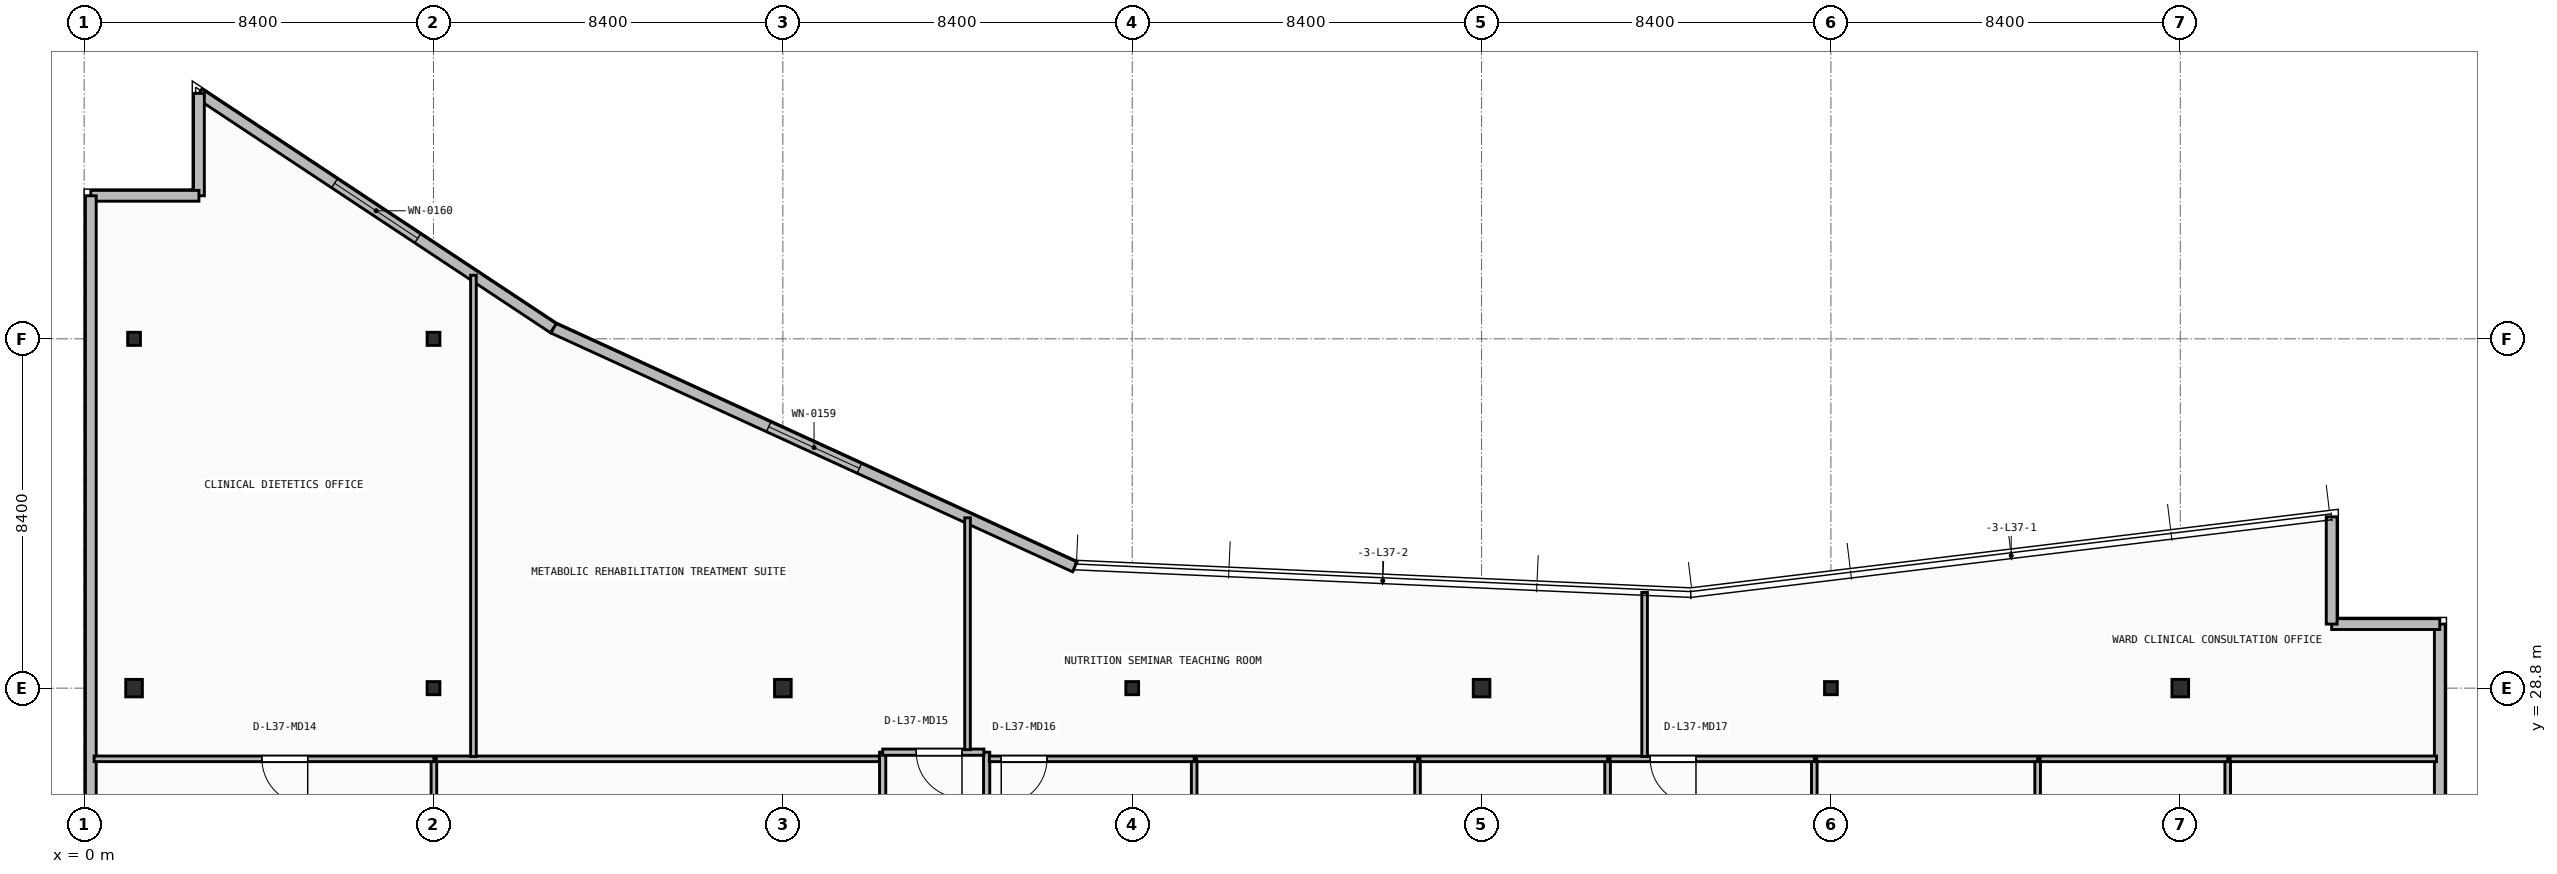
"""IFC4 building model, lengths in metres.
Left out: names, types, materials, properties, quantities, classifications, styles, units other than length and angle.
Written with IfcOpenShell. Run it as: python <this file> out.ifc"""

import sys

from ifc_helpers import new_model, si_unit, direction, frame, frame_2d, origin, origin_2d, place, context, subcontext, project, spatial, rectangle, i_section, extrude, element, fill, save


model = new_model("IFC4")
c1 = context("Model", 3, precision=1e-05, world=origin(), true_north=direction((0.0, 1.0)))
c2 = subcontext(c1, "Body", "Model", "MODEL_VIEW")
j1 = project(units=[si_unit("LENGTHUNIT", "METRE"), si_unit("PLANEANGLEUNIT", "RADIAN")], contexts=[c1])
p1 = place(None, origin())
s1 = spatial("IfcSite", under=j1, at=p1, CompositionType="ELEMENT")
p2 = place(p1, origin())
s2 = spatial("IfcBuilding", under=s1, at=p2, CompositionType="ELEMENT")
p3 = place(p2, frame((0.0, 0.0, 150.75)))
s3 = spatial("IfcBuildingStorey", under=s2, at=p3, CompositionType="ELEMENT", Elevation=150.75)
p4 = place(p3, frame((1.2, 28.8, 0.0), z_axis=(0.0, 0.0, 1.0), x_axis=(1.0, 0.0, 0.0)))
e1 = element("IfcColumn", 1, at=p4, inside=s3, PredefinedType="COLUMN", context=c2, shape_type="SweptSolid", body=[
    extrude(i_section(OverallWidth=0.4, OverallDepth=0.42, WebThickness=0.025, FlangeThickness=0.04, at=origin_2d()), origin(), (0.0, 0.0, 1.0), 3.95),
])
p5 = place(p3, frame((8.4, 28.8, 0.0), z_axis=(0.0, 0.0, 1.0), x_axis=(1.0, 0.0, 0.0)))
e2 = element("IfcColumn", 2, at=p5, inside=s3, PredefinedType="COLUMN", context=c2, shape_type="SweptSolid", body=[
    extrude(i_section(OverallWidth=0.307, OverallDepth=0.315, WebThickness=0.012, FlangeThickness=0.019, FilletRadius=0.017, at=origin_2d()), origin(), (0.0, 0.0, 1.0), 3.95),
])
p6 = place(p3, frame((16.8, 28.8, 0.0), z_axis=(0.0, 0.0, 1.0), x_axis=(1.0, 0.0, 0.0)))
e3 = element("IfcColumn", 3, at=p6, inside=s3, PredefinedType="COLUMN", context=c2, shape_type="SweptSolid", body=[
    extrude(i_section(OverallWidth=0.4, OverallDepth=0.42, WebThickness=0.025, FlangeThickness=0.04, at=origin_2d()), origin(), (0.0, 0.0, 1.0), 3.95),
])
p7 = place(p3, frame((25.2, 28.8, 0.0), z_axis=(0.0, 0.0, 1.0), x_axis=(1.0, 0.0, 0.0)))
e4 = element("IfcColumn", 4, at=p7, inside=s3, PredefinedType="COLUMN", context=c2, shape_type="SweptSolid", body=[
    extrude(i_section(OverallWidth=0.307, OverallDepth=0.315, WebThickness=0.012, FlangeThickness=0.019, FilletRadius=0.017, at=origin_2d()), origin(), (0.0, 0.0, 1.0), 3.95),
])
p8 = place(p3, frame((33.6, 28.8, 0.0), z_axis=(0.0, 0.0, 1.0), x_axis=(1.0, 0.0, 0.0)))
e5 = element("IfcColumn", 5, at=p8, inside=s3, PredefinedType="COLUMN", context=c2, shape_type="SweptSolid", body=[
    extrude(i_section(OverallWidth=0.4, OverallDepth=0.42, WebThickness=0.025, FlangeThickness=0.04, at=origin_2d()), origin(), (0.0, 0.0, 1.0), 3.95),
])
p9 = place(p3, frame((42.0, 28.8, 0.0), z_axis=(0.0, 0.0, 1.0), x_axis=(1.0, 0.0, 0.0)))
e6 = element("IfcColumn", 6, at=p9, inside=s3, PredefinedType="COLUMN", context=c2, shape_type="SweptSolid", body=[
    extrude(i_section(OverallWidth=0.307, OverallDepth=0.315, WebThickness=0.012, FlangeThickness=0.019, FilletRadius=0.017, at=origin_2d()), origin(), (0.0, 0.0, 1.0), 3.95),
])
p10 = place(p3, frame((50.4, 28.8, 0.0), z_axis=(0.0, 0.0, 1.0), x_axis=(1.0, 0.0, 0.0)))
e7 = element("IfcColumn", 7, at=p10, inside=s3, PredefinedType="COLUMN", context=c2, shape_type="SweptSolid", body=[
    extrude(i_section(OverallWidth=0.4, OverallDepth=0.42, WebThickness=0.025, FlangeThickness=0.04, at=origin_2d()), origin(), (0.0, 0.0, 1.0), 3.95),
])
for number, where, z_axis, x_axis in (
    (8, (1.2, 37.2, 0.0), (0.0, 0.0, 1.0), (1.0, 0.0, 0.0)),
    (9, (8.4, 37.2, 0.0), (0.0, 0.0, 1.0), (1.0, 0.0, 0.0)),
):
    element("IfcColumn", number, at=place(p3, frame(where, z_axis=z_axis, x_axis=x_axis)), inside=s3, PredefinedType="COLUMN", context=c2, shape_type="SweptSolid", body=[
        extrude(i_section(OverallWidth=0.307, OverallDepth=0.315, WebThickness=0.012, FlangeThickness=0.019, FilletRadius=0.017, at=origin_2d()), origin(), (0.0, 0.0, 1.0), 3.95),
    ])
p11 = place(p3, frame((56.64, 6.86, 0.0), z_axis=(0.0, 0.0, 1.0), x_axis=(0.0, 1.0, 0.0)))
e10 = element("IfcWall", 10, at=p11, inside=s3, PredefinedType="STANDARD", context=c2, shape_type="SweptSolid", body=[
    extrude(rectangle(XDim=23.48, YDim=0.26, at=frame_2d((11.74, 0.0))), origin(), (0.0, 0.0, 1.0), 3.71),
])
p12 = place(p11, frame((9.24, 0.0, 0.0)))
e11 = element("IfcOpeningElement", 11, at=p12, cuts=e10, PredefinedType="OPENING", context=c2, shape_type="SweptSolid", body=[
    extrude(rectangle(XDim=1.3, YDim=2.15, at=frame_2d((0.65, 1.075))), frame((0.0, 0.14, 0.0), z_axis=(0.0, -1.0, 0.0), x_axis=(1.0, 0.0, 0.0)), (0.0, 0.0, 1.0), 0.28),
])
p13 = place(p3, frame((56.64, 30.34, 0.0), z_axis=(0.0, 0.0, 1.0), x_axis=(-1.0, 0.0, 0.0)))
e12 = element("IfcWall", 12, at=p13, inside=s3, PredefinedType="STANDARD", context=c2, shape_type="SweptSolid", body=[
    extrude(rectangle(XDim=2.6, YDim=0.26, at=frame_2d((1.3, 0.0))), origin(), (0.0, 0.0, 1.0), 3.71),
])
p14 = place(p3, frame((54.04, 30.34, 0.0), z_axis=(0.0, 0.0, 1.0), x_axis=(0.0, 1.0, 0.0)))
e13 = element("IfcWall", 13, at=p14, inside=s3, PredefinedType="STANDARD", context=c2, shape_type="SweptSolid", body=[
    extrude(rectangle(XDim=2.579, YDim=0.26, at=frame_2d((1.29, 0.0))), origin(), (0.0, 0.0, 1.0), 3.71),
])
p15 = place(p3, frame((23.818, 31.716, 0.0), z_axis=(0.0, 0.0, 1.0), x_axis=(-0.909209527513, 0.416338846471, 0.0)))
e14 = element("IfcWall", 14, at=p15, inside=s3, PredefinedType="STANDARD", context=c2, shape_type="SweptSolid", body=[
    extrude(rectangle(XDim=13.787, YDim=0.26, at=frame_2d((6.894, 0.0))), origin(), (0.0, 0.0, 1.0), 3.71),
])
p16 = place(p15, frame((5.694, 0.0, 0.9)))
e15 = element("IfcOpeningElement", 15, at=p16, cuts=e14, PredefinedType="OPENING", context=c2, shape_type="SweptSolid", body=[
    extrude(rectangle(XDim=2.4, YDim=1.65, at=frame_2d((1.2, 0.825))), frame((0.0, 0.14, 0.0), z_axis=(0.0, -1.0, 0.0), x_axis=(1.0, 0.0, 0.0)), (0.0, 0.0, 1.0), 0.28),
])
p17 = place(p3, frame((11.282, 37.456, 0.0), z_axis=(0.0, 0.0, 1.0), x_axis=(-0.833630474253, 0.552322580017, 0.0)))
e16 = element("IfcWall", 16, at=p17, inside=s3, PredefinedType="STANDARD", context=c2, shape_type="SweptSolid", body=[
    extrude(rectangle(XDim=10.223, YDim=0.26, at=frame_2d((5.111, 0.0))), origin(), (0.0, 0.0, 1.0), 3.71),
])
p18 = place(p17, frame((3.911, 0.0, 0.9)))
e17 = element("IfcOpeningElement", 17, at=p18, cuts=e16, PredefinedType="OPENING", context=c2, shape_type="SweptSolid", body=[
    extrude(rectangle(XDim=2.4, YDim=1.65, at=frame_2d((1.2, 0.825))), frame((0.0, 0.14, 0.0), z_axis=(0.0, -1.0, 0.0), x_axis=(1.0, 0.0, 0.0)), (0.0, 0.0, 1.0), 0.28),
])
p19 = place(p3, frame((2.76, 43.102, 0.0), z_axis=(0.0, 0.0, 1.0), x_axis=(0.0, -1.0, 0.0)))
e18 = element("IfcWall", 18, at=p19, inside=s3, PredefinedType="STANDARD", context=c2, shape_type="SweptSolid", body=[
    extrude(rectangle(XDim=2.462, YDim=0.26, at=frame_2d((1.231, 0.0))), origin(), (0.0, 0.0, 1.0), 3.71),
])
p20 = place(p3, frame((2.76, 40.64, 0.0), z_axis=(0.0, 0.0, 1.0), x_axis=(-1.0, 0.0, 0.0)))
e19 = element("IfcWall", 19, at=p20, inside=s3, PredefinedType="STANDARD", context=c2, shape_type="SweptSolid", body=[
    extrude(rectangle(XDim=2.6, YDim=0.26, at=frame_2d((1.3, 0.0))), origin(), (0.0, 0.0, 1.0), 3.71),
])
p21 = place(p3, frame((0.16, 40.64, 0.0), z_axis=(0.0, 0.0, 1.0), x_axis=(0.0, -1.0, 0.0)))
e20 = element("IfcWall", 20, at=p21, inside=s3, PredefinedType="STANDARD", context=c2, shape_type="SweptSolid", body=[
    extrude(rectangle(XDim=37.88, YDim=0.26, at=frame_2d((18.94, 0.0))), origin(), (0.0, 0.0, 1.0), 3.71),
])
p22 = place(p21, frame((27.795, 0.0, 0.9)))
e21 = element("IfcOpeningElement", 21, at=p22, cuts=e20, PredefinedType="OPENING", context=c2, shape_type="SweptSolid", body=[
    extrude(rectangle(XDim=2.4, YDim=1.65, at=frame_2d((1.2, 0.825))), frame((0.0, 0.14, 0.0), z_axis=(0.0, -1.0, 0.0), x_axis=(1.0, 0.0, 0.0)), (0.0, 0.0, 1.0), 0.28),
])
p23 = place(p3, frame((19.2, 27.26, 0.0), z_axis=(0.0, 0.0, 1.0), x_axis=(0.0, -1.0, 0.0)))
e22 = element("IfcWall", 22, at=p23, inside=s3, PredefinedType="PARTITIONING", context=c2, shape_type="SweptSolid", body=[
    extrude(rectangle(XDim=6.482, YDim=0.15, at=frame_2d((3.241, 0.0))), origin(), (0.0, 0.0, 1.0), 3.71),
])
p24 = place(p23, frame((2.068, 0.0, 0.0)))
e23 = element("IfcOpeningElement", 23, at=p24, cuts=e22, PredefinedType="OPENING", context=c2, shape_type="SweptSolid", body=[
    extrude(rectangle(XDim=1.1, YDim=2.1, at=frame_2d((0.55, 1.05))), frame((0.0, 0.085, 0.0), z_axis=(0.0, -1.0, 0.0), x_axis=(1.0, 0.0, 0.0)), (0.0, 0.0, 1.0), 0.17),
])
p25 = place(p3, frame((21.7, 20.504, 0.0), z_axis=(0.0, 0.0, 1.0), x_axis=(0.0, 1.0, 0.0)))
e24 = element("IfcWall", 24, at=p25, inside=s3, PredefinedType="PARTITIONING", context=c2, shape_type="SweptSolid", body=[
    extrude(rectangle(XDim=6.756, YDim=0.15, at=frame_2d((3.378, 0.0))), origin(), (0.0, 0.0, 1.0), 3.71),
])
p26 = place(p25, frame((2.828, 0.0, 0.0)))
e25 = element("IfcOpeningElement", 25, at=p26, cuts=e24, PredefinedType="OPENING", context=c2, shape_type="SweptSolid", body=[
    extrude(rectangle(XDim=1.1, YDim=2.1, at=frame_2d((0.55, 1.05))), frame((0.0, 0.085, 0.0), z_axis=(0.0, -1.0, 0.0), x_axis=(1.0, 0.0, 0.0)), (0.0, 0.0, 1.0), 0.17),
])
p27 = place(p3, frame((21.635, 27.26, 0.0), z_axis=(0.0, 0.0, 1.0), x_axis=(-1.0, 0.0, 0.0)))
e26 = element("IfcWall", 26, at=p27, inside=s3, PredefinedType="PARTITIONING", context=c2, shape_type="SweptSolid", body=[
    extrude(rectangle(XDim=2.435, YDim=0.15, at=frame_2d((1.218, 0.0))), origin(), (0.0, 0.0, 1.0), 3.71),
])
p28 = place(p27, frame((0.527, 0.0, 0.0)))
e27 = element("IfcOpeningElement", 27, at=p28, cuts=e26, PredefinedType="OPENING", context=c2, shape_type="SweptSolid", body=[
    extrude(rectangle(XDim=1.1, YDim=2.1, at=frame_2d((0.55, 1.05))), frame((0.0, 0.085, 0.0), z_axis=(0.0, -1.0, 0.0), x_axis=(1.0, 0.0, 0.0)), (0.0, 0.0, 1.0), 0.17),
])
p29 = place(p3, frame((8.41, 20.607, 0.0), z_axis=(0.0, 0.0, 1.0), x_axis=(0.0, 1.0, 0.0)))
e28 = element("IfcWall", 28, at=p29, inside=s3, PredefinedType="PARTITIONING", context=c2, shape_type="SweptSolid", body=[
    extrude(rectangle(XDim=6.493, YDim=0.135, at=frame_2d((3.246, 0.0))), origin(), (0.0, 0.0, 1.0), 3.152),
])
p30 = place(p3, frame((8.41, 27.1, 0.0), z_axis=(0.0, 0.0, 1.0), x_axis=(-1.0, 0.0, 0.0)))
e29 = element("IfcWall", 29, at=p30, inside=s3, PredefinedType="PARTITIONING", context=c2, shape_type="SweptSolid", body=[
    extrude(rectangle(XDim=8.17, YDim=0.135, at=frame_2d((4.085, 0.0))), origin(), (0.0, 0.0, 1.0), 3.71),
])
p31 = place(p30, frame((3.035, 0.0, 0.0)))
e30 = element("IfcOpeningElement", 30, at=p31, cuts=e29, PredefinedType="OPENING", context=c2, shape_type="SweptSolid", body=[
    extrude(rectangle(XDim=1.1, YDim=2.1, at=frame_2d((0.55, 1.05))), frame((0.0, 0.077, 0.0), z_axis=(0.0, -1.0, 0.0), x_axis=(1.0, 0.0, 0.0)), (0.0, 0.0, 1.0), 0.155),
])
p32 = place(p3, frame((19.12, 27.1, 0.0), z_axis=(0.0, 0.0, 1.0), x_axis=(-1.0, 0.0, 0.0)))
e31 = element("IfcWall", 31, at=p32, inside=s3, PredefinedType="PARTITIONING", context=c2, shape_type="SweptSolid", body=[
    extrude(rectangle(XDim=10.653, YDim=0.135, at=frame_2d((5.326, 0.0))), origin(), (0.0, 0.0, 1.0), 3.71),
])
p33 = place(p3, frame((26.69, 20.715, 0.0), z_axis=(0.0, 0.0, 1.0), x_axis=(0.0, 1.0, 0.0)))
e32 = element("IfcWall", 32, at=p33, inside=s3, PredefinedType="PARTITIONING", context=c2, shape_type="SweptSolid", body=[
    extrude(rectangle(XDim=6.385, YDim=0.135, at=frame_2d((3.192, 0.0))), origin(), (0.0, 0.0, 1.0), 3.71),
])
p34 = place(p3, frame((26.69, 27.1, 0.0), z_axis=(0.0, 0.0, 1.0), x_axis=(-1.0, 0.0, 0.0)))
e33 = element("IfcWall", 33, at=p34, inside=s3, PredefinedType="PARTITIONING", context=c2, shape_type="SweptSolid", body=[
    extrude(rectangle(XDim=4.925, YDim=0.135, at=frame_2d((2.462, 0.0))), origin(), (0.0, 0.0, 1.0), 3.71),
])
p35 = place(p34, frame((3.539, 0.0, 0.0)))
e34 = element("IfcOpeningElement", 34, at=p35, cuts=e33, PredefinedType="OPENING", context=c2, shape_type="SweptSolid", body=[
    extrude(rectangle(XDim=1.1, YDim=2.1, at=frame_2d((0.55, 1.05))), frame((0.0, 0.077, 0.0), z_axis=(0.0, -1.0, 0.0), x_axis=(1.0, 0.0, 0.0)), (0.0, 0.0, 1.0), 0.155),
])
p36 = place(p3, frame((32.06, 20.715, 0.0), z_axis=(0.0, 0.0, 1.0), x_axis=(0.0, 1.0, 0.0)))
e35 = element("IfcWall", 35, at=p36, inside=s3, PredefinedType="PARTITIONING", context=c2, shape_type="SweptSolid", body=[
    extrude(rectangle(XDim=6.385, YDim=0.135, at=frame_2d((3.192, 0.0))), origin(), (0.0, 0.0, 1.0), 3.71),
])
p37 = place(p3, frame((32.06, 27.1, 0.0), z_axis=(0.0, 0.0, 1.0), x_axis=(-1.0, 0.0, 0.0)))
e36 = element("IfcWall", 36, at=p37, inside=s3, PredefinedType="PARTITIONING", context=c2, shape_type="SweptSolid", body=[
    extrude(rectangle(XDim=5.312, YDim=0.135, at=frame_2d((2.656, 0.0))), origin(), (0.0, 0.0, 1.0), 3.71),
])
p38 = place(p3, frame((36.63, 20.715, 0.0), z_axis=(0.0, 0.0, 1.0), x_axis=(0.0, 1.0, 0.0)))
e37 = element("IfcWall", 37, at=p38, inside=s3, PredefinedType="PARTITIONING", context=c2, shape_type="SweptSolid", body=[
    extrude(rectangle(XDim=6.385, YDim=0.135, at=frame_2d((3.192, 0.0))), origin(), (0.0, 0.0, 1.0), 3.71),
])
p39 = place(p3, frame((36.63, 27.1, 0.0), z_axis=(0.0, 0.0, 1.0), x_axis=(-1.0, 0.0, 0.0)))
e38 = element("IfcWall", 38, at=p39, inside=s3, PredefinedType="PARTITIONING", context=c2, shape_type="SweptSolid", body=[
    extrude(rectangle(XDim=4.512, YDim=0.135, at=frame_2d((2.256, 0.0))), origin(), (0.0, 0.0, 1.0), 3.71),
])
p40 = place(p3, frame((41.6, 20.715, 0.0), z_axis=(0.0, 0.0, 1.0), x_axis=(0.0, 1.0, 0.0)))
e39 = element("IfcWall", 39, at=p40, inside=s3, PredefinedType="PARTITIONING", context=c2, shape_type="SweptSolid", body=[
    extrude(rectangle(XDim=6.385, YDim=0.135, at=frame_2d((3.192, 0.0))), origin(), (0.0, 0.0, 1.0), 3.152),
])
p41 = place(p3, frame((41.6, 27.1, 0.0), z_axis=(0.0, 0.0, 1.0), x_axis=(-1.0, 0.0, 0.0)))
e40 = element("IfcWall", 40, at=p41, inside=s3, PredefinedType="PARTITIONING", context=c2, shape_type="SweptSolid", body=[
    extrude(rectangle(XDim=4.913, YDim=0.135, at=frame_2d((2.456, 0.0))), origin(), (0.0, 0.0, 1.0), 3.71),
])
p42 = place(p41, frame((2.845, 0.0, 0.0)))
e41 = element("IfcOpeningElement", 41, at=p42, cuts=e40, PredefinedType="OPENING", context=c2, shape_type="SweptSolid", body=[
    extrude(rectangle(XDim=1.1, YDim=2.1, at=frame_2d((0.55, 1.05))), frame((0.0, 0.077, 0.0), z_axis=(0.0, -1.0, 0.0), x_axis=(1.0, 0.0, 0.0)), (0.0, 0.0, 1.0), 0.155),
])
p43 = place(p3, frame((46.97, 20.715, 0.0), z_axis=(0.0, 0.0, 1.0), x_axis=(0.0, 1.0, 0.0)))
e42 = element("IfcWall", 42, at=p43, inside=s3, PredefinedType="PARTITIONING", context=c2, shape_type="SweptSolid", body=[
    extrude(rectangle(XDim=6.385, YDim=0.135, at=frame_2d((3.192, 0.0))), origin(), (0.0, 0.0, 1.0), 3.71),
])
p44 = place(p3, frame((46.97, 27.1, 0.0), z_axis=(0.0, 0.0, 1.0), x_axis=(-1.0, 0.0, 0.0)))
e43 = element("IfcWall", 43, at=p44, inside=s3, PredefinedType="PARTITIONING", context=c2, shape_type="SweptSolid", body=[
    extrude(rectangle(XDim=5.312, YDim=0.135, at=frame_2d((2.656, 0.0))), origin(), (0.0, 0.0, 1.0), 3.71),
])
p45 = place(p3, frame((51.54, 20.715, 0.0), z_axis=(0.0, 0.0, 1.0), x_axis=(0.0, 1.0, 0.0)))
e44 = element("IfcWall", 44, at=p45, inside=s3, PredefinedType="PARTITIONING", context=c2, shape_type="SweptSolid", body=[
    extrude(rectangle(XDim=6.385, YDim=0.135, at=frame_2d((3.192, 0.0))), origin(), (0.0, 0.0, 1.0), 3.71),
])
p46 = place(p3, frame((51.54, 27.1, 0.0), z_axis=(0.0, 0.0, 1.0), x_axis=(-1.0, 0.0, 0.0)))
e45 = element("IfcWall", 45, at=p46, inside=s3, PredefinedType="PARTITIONING", context=c2, shape_type="SweptSolid", body=[
    extrude(rectangle(XDim=4.512, YDim=0.135, at=frame_2d((2.256, 0.0))), origin(), (0.0, 0.0, 1.0), 3.71),
])
p47 = place(p3, frame((56.56, 27.1, 0.0), z_axis=(0.0, 0.0, 1.0), x_axis=(-1.0, 0.0, 0.0)))
e46 = element("IfcWall", 46, at=p47, inside=s3, PredefinedType="PARTITIONING", context=c2, shape_type="SweptSolid", body=[
    extrude(rectangle(XDim=4.963, YDim=0.135, at=frame_2d((2.481, 0.0))), origin(), (0.0, 0.0, 1.0), 3.71),
])
p48 = place(p3, frame((9.36, 27.157, 0.0), z_axis=(0.0, 0.0, 1.0), x_axis=(0.0, 1.0, 0.0)))
e47 = element("IfcWall", 47, at=p48, inside=s3, PredefinedType="PARTITIONING", context=c2, shape_type="SweptSolid", body=[
    extrude(rectangle(XDim=11.572, YDim=0.135, at=frame_2d((5.786, 0.0))), origin(), (0.0, 0.0, 1.0), 3.71),
])
p49 = place(p3, frame((21.24, 27.32, 0.0), z_axis=(0.0, 0.0, 1.0), x_axis=(0.0, 1.0, 0.0)))
e48 = element("IfcWall", 48, at=p49, inside=s3, PredefinedType="PARTITIONING", context=c2, shape_type="SweptSolid", body=[
    extrude(rectangle(XDim=5.576, YDim=0.135, at=frame_2d((2.788, 0.0))), origin(), (0.0, 0.0, 1.0), 3.71),
])
p50 = place(p3, frame((37.52, 27.157, 0.0), z_axis=(0.0, 0.0, 1.0), x_axis=(0.0, 1.0, 0.0)))
e49 = element("IfcWall", 49, at=p50, inside=s3, PredefinedType="PARTITIONING", context=c2, shape_type="SweptSolid", body=[
    extrude(rectangle(XDim=3.944, YDim=0.135, at=frame_2d((1.972, 0.0))), origin(), (0.0, 0.0, 1.0), 3.71),
])
p51 = place(p16, origin())
e50 = element("IfcWindow", 50, at=p51, inside=s3, PartitioningType="SINGLE_PANEL", PredefinedType="WINDOW", context=c2, shape_type="SweptSolid", body=[
    extrude(rectangle(XDim=2.4, YDim=1.65, at=frame_2d((1.2, 0.825))), frame((0.0, 0.03, 0.0), z_axis=(0.0, -1.0, 0.0), x_axis=(1.0, 0.0, 0.0)), (0.0, 0.0, 1.0), 0.06),
])
fill(e15, e50)
p52 = place(p18, origin())
e51 = element("IfcWindow", 51, at=p52, inside=s3, PartitioningType="SINGLE_PANEL", PredefinedType="WINDOW", context=c2, shape_type="SweptSolid", body=[
    extrude(rectangle(XDim=2.4, YDim=1.65, at=frame_2d((1.2, 0.825))), frame((0.0, 0.03, 0.0), z_axis=(0.0, -1.0, 0.0), x_axis=(1.0, 0.0, 0.0)), (0.0, 0.0, 1.0), 0.06),
])
fill(e17, e51)
p53 = place(p28, origin())
e52 = element("IfcDoor", 52, at=p53, inside=s3, OperationType="SINGLE_SWING_LEFT", PredefinedType="DOOR", context=c2, shape_type="SweptSolid", body=[
    extrude(rectangle(XDim=1.1, YDim=2.1, at=frame_2d((0.55, 1.05))), frame((0.0, 0.025, 0.0), z_axis=(0.0, -1.0, 0.0), x_axis=(1.0, 0.0, 0.0)), (0.0, 0.0, 1.0), 0.05),
])
fill(e27, e52)
p54 = place(p31, origin())
e53 = element("IfcDoor", 53, at=p54, inside=s3, OperationType="SINGLE_SWING_LEFT", PredefinedType="DOOR", context=c2, shape_type="SweptSolid", body=[
    extrude(rectangle(XDim=1.1, YDim=2.1, at=frame_2d((0.55, 1.05))), frame((0.0, 0.025, 0.0), z_axis=(0.0, -1.0, 0.0), x_axis=(1.0, 0.0, 0.0)), (0.0, 0.0, 1.0), 0.05),
])
fill(e30, e53)
p55 = place(p35, origin())
e54 = element("IfcDoor", 54, at=p55, inside=s3, OperationType="SINGLE_SWING_RIGHT", PredefinedType="DOOR", context=c2, shape_type="SweptSolid", body=[
    extrude(rectangle(XDim=1.1, YDim=2.1, at=frame_2d((0.55, 1.05))), frame((0.0, 0.025, 0.0), z_axis=(0.0, -1.0, 0.0), x_axis=(1.0, 0.0, 0.0)), (0.0, 0.0, 1.0), 0.05),
])
fill(e34, e54)
p56 = place(p42, origin())
e55 = element("IfcDoor", 55, at=p56, inside=s3, OperationType="SINGLE_SWING_LEFT", PredefinedType="DOOR", context=c2, shape_type="SweptSolid", body=[
    extrude(rectangle(XDim=1.1, YDim=2.1, at=frame_2d((0.55, 1.05))), frame((0.0, 0.025, 0.0), z_axis=(0.0, -1.0, 0.0), x_axis=(1.0, 0.0, 0.0)), (0.0, 0.0, 1.0), 0.05),
])
fill(e41, e55)
save(model, sys.argv[1])
